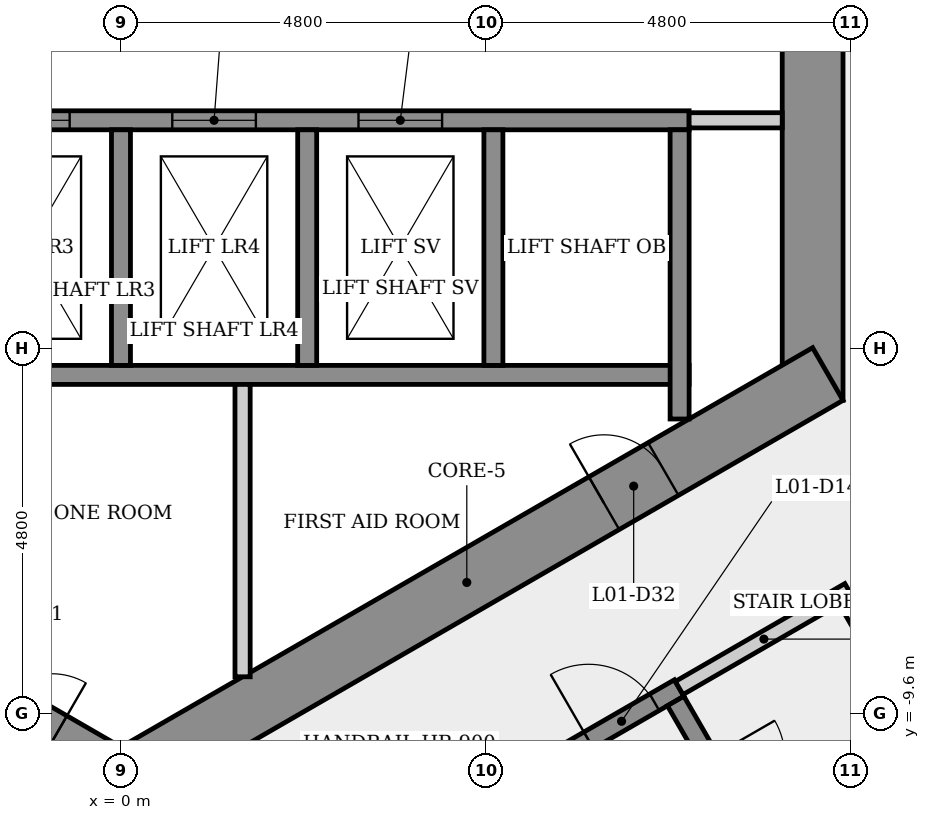
"""IFC4 building model, lengths in metres.
Left out: names, types, materials, properties, quantities, classifications, styles, units other than length and angle.
Written with IfcOpenShell. Run it as: python <this file> out.ifc"""

import sys

from ifc_helpers import new_model, si_unit, direction, frame, frame_2d, origin, place, context, subcontext, project, spatial, rectangle, extrude, element, fill, save


model = new_model("IFC4")
c1 = context("Model", 3, precision=1e-05, world=origin(), true_north=direction((0.0, 1.0)))
c2 = subcontext(c1, "Body", "Model", "MODEL_VIEW")
j1 = project(units=[si_unit("LENGTHUNIT", "METRE"), si_unit("PLANEANGLEUNIT", "RADIAN")], contexts=[c1])
p1 = place(None, origin())
s1 = spatial("IfcSite", under=j1, at=p1, CompositionType="ELEMENT")
p2 = place(p1, origin())
s2 = spatial("IfcBuilding", under=s1, at=p2, CompositionType="ELEMENT")
p3 = place(p2, frame((0.0, 0.0, 7.0)))
s3 = spatial("IfcBuildingStorey", under=s2, at=p3, CompositionType="ELEMENT", Elevation=7.0)
p4 = place(p3, frame((9.1, -5.485, 0.0), z_axis=(0.0, 0.0, 1.0), x_axis=(0.0, 1.0, 0.0)))
e1 = element("IfcWall", 1, at=p4, inside=s3, PredefinedType="SHEAR", context=c2, shape_type="SweptSolid", body=[
    extrude(rectangle(XDim=10.97, YDim=0.8, at=frame_2d((5.485, 0.0))), origin(), (0.0, 0.0, 1.0), 4.5),
])
p5 = place(p4, frame((4.685, 0.0, 0.0)))
e2 = element("IfcOpeningElement", 2, at=p5, cuts=e1, PredefinedType="OPENING", context=c2, shape_type="SweptSolid", body=[
    extrude(rectangle(XDim=1.6, YDim=2.1, at=frame_2d((0.8, 1.05))), frame((0.0, 0.41, 0.0), z_axis=(0.0, -1.0, 0.0), x_axis=(1.0, 0.0, 0.0)), (0.0, 0.0, 1.0), 0.82),
])
p6 = place(p3, frame((-9.3, -5.138, 0.0), z_axis=(0.0, 0.0, 1.0), x_axis=(0.866023993627, -0.500002442456, 0.0)))
e3 = element("IfcWall", 3, at=p6, inside=s3, PredefinedType="SHEAR", context=c2, shape_type="SweptSolid", body=[
    extrude(rectangle(XDim=10.97, YDim=0.8, at=frame_2d((5.485, 0.0))), origin(), (0.0, 0.0, 1.0), 4.5),
])
p7 = place(p6, frame((2.153, 0.0, 0.0)))
e4 = element("IfcOpeningElement", 4, at=p7, cuts=e3, PredefinedType="OPENING", context=c2, shape_type="SweptSolid", body=[
    extrude(rectangle(XDim=0.9, YDim=2.1, at=frame_2d((0.45, 1.05))), frame((0.0, 0.41, 0.0), z_axis=(0.0, -1.0, 0.0), x_axis=(1.0, 0.0, 0.0)), (0.0, 0.0, 1.0), 0.82),
])
p8 = place(p6, frame((8.787, 0.0, 0.0)))
e5 = element("IfcOpeningElement", 5, at=p8, cuts=e3, PredefinedType="OPENING", context=c2, shape_type="SweptSolid", body=[
    extrude(rectangle(XDim=0.9, YDim=2.1, at=frame_2d((0.45, 1.05))), frame((0.0, 0.41, 0.0), z_axis=(0.0, -1.0, 0.0), x_axis=(1.0, 0.0, 0.0)), (0.0, 0.0, 1.0), 0.82),
])
p9 = place(p3, frame((-0.2, -10.623, 0.0), z_axis=(0.0, 0.0, 1.0), x_axis=(0.866023993627, 0.500002442456, 0.0)))
e6 = element("IfcWall", 6, at=p9, inside=s3, PredefinedType="SHEAR", context=c2, shape_type="SweptSolid", body=[
    extrude(rectangle(XDim=10.97, YDim=0.8, at=frame_2d((5.485, 0.0))), origin(), (0.0, 0.0, 1.0), 4.5),
])
p10 = place(p9, frame((7.57, 0.0, 0.0)))
e7 = element("IfcOpeningElement", 7, at=p10, cuts=e6, PredefinedType="OPENING", context=c2, shape_type="SweptSolid", body=[
    extrude(rectangle(XDim=0.9, YDim=2.1, at=frame_2d((0.45, 1.05))), frame((0.0, 0.41, 0.0), z_axis=(0.0, -1.0, 0.0), x_axis=(1.0, 0.0, 0.0)), (0.0, 0.0, 1.0), 0.82),
])
p11 = place(p3, frame((-7.225, -5.15, 0.0), z_axis=(0.0, 0.0, 1.0), x_axis=(1.0, 0.0, 0.0)))
e8 = element("IfcWall", 8, at=p11, inside=s3, PredefinedType="SHEAR", context=c2, shape_type="SweptSolid", body=[
    extrude(rectangle(XDim=14.7, YDim=0.25, at=frame_2d((7.35, 0.0))), origin(), (0.0, 0.0, 1.0), 4.1),
])
p12 = place(p3, frame((-7.225, -1.8, 0.0), z_axis=(0.0, 0.0, 1.0), x_axis=(1.0, 0.0, 0.0)))
e9 = element("IfcWall", 9, at=p12, inside=s3, PredefinedType="SHEAR", context=c2, shape_type="SweptSolid", body=[
    extrude(rectangle(XDim=14.7, YDim=0.25, at=frame_2d((7.35, 0.0))), origin(), (0.0, 0.0, 1.0), 4.1),
])
p13 = place(p12, frame((0.597, 0.0, 0.0)))
e10 = element("IfcOpeningElement", 10, at=p13, cuts=e9, PredefinedType="OPENING", context=c2, shape_type="SweptSolid", body=[
    extrude(rectangle(XDim=1.1, YDim=2.1, at=frame_2d((0.55, 1.05))), frame((0.0, 0.135, 0.0), z_axis=(0.0, -1.0, 0.0), x_axis=(1.0, 0.0, 0.0)), (0.0, 0.0, 1.0), 0.27),
])
p14 = place(p12, frame((3.0, 0.0, 0.0)))
e11 = element("IfcOpeningElement", 11, at=p14, cuts=e9, PredefinedType="OPENING", context=c2, shape_type="SweptSolid", body=[
    extrude(rectangle(XDim=1.1, YDim=2.1, at=frame_2d((0.55, 1.05))), frame((0.0, 0.135, 0.0), z_axis=(0.0, -1.0, 0.0), x_axis=(1.0, 0.0, 0.0)), (0.0, 0.0, 1.0), 0.27),
])
p15 = place(p12, frame((5.45, 0.0, 0.0)))
e12 = element("IfcOpeningElement", 12, at=p15, cuts=e9, PredefinedType="OPENING", context=c2, shape_type="SweptSolid", body=[
    extrude(rectangle(XDim=1.1, YDim=2.1, at=frame_2d((0.55, 1.05))), frame((0.0, 0.135, 0.0), z_axis=(0.0, -1.0, 0.0), x_axis=(1.0, 0.0, 0.0)), (0.0, 0.0, 1.0), 0.27),
])
p16 = place(p12, frame((7.9, 0.0, 0.0)))
e13 = element("IfcOpeningElement", 13, at=p16, cuts=e9, PredefinedType="OPENING", context=c2, shape_type="SweptSolid", body=[
    extrude(rectangle(XDim=1.1, YDim=2.1, at=frame_2d((0.55, 1.05))), frame((0.0, 0.135, 0.0), z_axis=(0.0, -1.0, 0.0), x_axis=(1.0, 0.0, 0.0)), (0.0, 0.0, 1.0), 0.27),
])
p17 = place(p12, frame((10.35, 0.0, 0.0)))
e14 = element("IfcOpeningElement", 14, at=p17, cuts=e9, PredefinedType="OPENING", context=c2, shape_type="SweptSolid", body=[
    extrude(rectangle(XDim=1.1, YDim=2.1, at=frame_2d((0.55, 1.05))), frame((0.0, 0.135, 0.0), z_axis=(0.0, -1.0, 0.0), x_axis=(1.0, 0.0, 0.0)), (0.0, 0.0, 1.0), 0.27),
])
p18 = place(p3, frame((0.0, -1.925, 0.0), z_axis=(0.0, 0.0, 1.0), x_axis=(0.0, -1.0, 0.0)))
e15 = element("IfcWall", 15, at=p18, inside=s3, PredefinedType="SHEAR", context=c2, shape_type="SweptSolid", body=[
    extrude(rectangle(XDim=3.1, YDim=0.25, at=frame_2d((1.55, 0.0))), origin(), (0.0, 0.0, 1.0), 4.5),
])
p19 = place(p3, frame((1.6, -5.275, 0.0), z_axis=(0.0, 0.0, 1.0), x_axis=(0.0, -1.0, 0.0)))
e16 = element("IfcWall", 16, at=p19, inside=s3, PredefinedType="PARTITIONING", context=c2, shape_type="SweptSolid", body=[
    extrude(rectangle(XDim=3.847, YDim=0.2, at=frame_2d((1.924, 0.0))), origin(), (0.0, 0.0, 1.0), 4.1),
])
p20 = place(p3, frame((1.585, -12.595, 0.0), z_axis=(0.0, 0.0, 1.0), x_axis=(0.866036417653, 0.499980922934, 0.0)))
e17 = element("IfcWall", 17, at=p20, inside=s3, PredefinedType="SHEAR", context=c2, shape_type="SweptSolid", body=[
    extrude(rectangle(XDim=6.65, YDim=0.25, at=frame_2d((3.325, 0.0))), origin(), (0.0, 0.0, 1.0), 4.1),
])
p21 = place(p20, frame((5.275, 0.0, 0.0)))
e18 = element("IfcOpeningElement", 18, at=p21, cuts=e17, PredefinedType="OPENING", context=c2, shape_type="SweptSolid", body=[
    extrude(rectangle(XDim=1.0, YDim=2.1, at=frame_2d((0.5, 1.05))), frame((0.0, 0.135, 0.0), z_axis=(0.0, -1.0, 0.0), x_axis=(1.0, 0.0, 0.0)), (0.0, 0.0, 1.0), 0.27),
])
for number, where, z_axis, x_axis in (
    (19, (2.45, -1.925, 0.0), (0.0, 0.0, 1.0), (0.0, -1.0, 0.0)),
    (20, (4.9, -1.925, 0.0), (0.0, 0.0, 1.0), (0.0, -1.0, 0.0)),
):
    element("IfcWall", number, at=place(p3, frame(where, z_axis=z_axis, x_axis=x_axis)), inside=s3, PredefinedType="SHEAR", context=c2, shape_type="SweptSolid", body=[
        extrude(rectangle(XDim=3.1, YDim=0.25, at=frame_2d((1.55, 0.0))), origin(), (0.0, 0.0, 1.0), 4.5),
    ])
p22 = place(p3, frame((7.298, -9.441, 0.0), z_axis=(0.0, 0.0, 1.0), x_axis=(0.500034990121, -0.866005201286, 0.0)))
e21 = element("IfcWall", 21, at=p22, inside=s3, PredefinedType="SHEAR", context=c2, shape_type="SweptSolid", body=[
    extrude(rectangle(XDim=2.75, YDim=0.25, at=frame_2d((1.375, 0.0))), origin(), (0.0, 0.0, 1.0), 4.1),
])
p23 = place(p22, frame((0.875, 0.0, 0.0)))
e22 = element("IfcOpeningElement", 22, at=p23, cuts=e21, PredefinedType="OPENING", context=c2, shape_type="SweptSolid", body=[
    extrude(rectangle(XDim=1.0, YDim=2.1, at=frame_2d((0.5, 1.05))), frame((0.0, 0.135, 0.0), z_axis=(0.0, -1.0, 0.0), x_axis=(1.0, 0.0, 0.0)), (0.0, 0.0, 1.0), 0.27),
])
p24 = place(p3, frame((7.344, -9.27, 0.0), z_axis=(0.0, 0.0, 1.0), x_axis=(0.866005588531, 0.500034319456, 0.0)))
e23 = element("IfcWall", 23, at=p24, inside=s3, PredefinedType="PARTITIONING", context=c2, shape_type="SweptSolid", body=[
    extrude(rectangle(XDim=2.575, YDim=0.2, at=frame_2d((1.288, 0.0))), origin(), (0.0, 0.0, 1.0), 4.1),
])
p25 = place(p3, frame((7.35, -1.925, 0.0), z_axis=(0.0, 0.0, 1.0), x_axis=(0.0, -1.0, 0.0)))
e24 = element("IfcWall", 24, at=p25, inside=s3, PredefinedType="SHEAR", context=c2, shape_type="SweptSolid", body=[
    extrude(rectangle(XDim=3.805, YDim=0.25, at=frame_2d((1.903, 0.0))), origin(), (0.0, 0.0, 1.0), 4.1),
])
p26 = place(p3, frame((8.7, -1.8, 0.0), z_axis=(0.0, 0.0, 1.0), x_axis=(-1.0, 0.0, 0.0)))
e25 = element("IfcWall", 25, at=p26, inside=s3, PredefinedType="PARTITIONING", context=c2, shape_type="SweptSolid", body=[
    extrude(rectangle(XDim=1.225, YDim=0.2, at=frame_2d((0.613, 0.0))), origin(), (0.0, 0.0, 1.0), 4.1),
])
p27 = place(p3, frame((9.537, -8.119, 0.0), z_axis=(0.0, 0.0, 1.0), x_axis=(0.499990139034, -0.866031096941, 0.0)))
e26 = element("IfcWall", 26, at=p27, inside=s3, PredefinedType="PARTITIONING", context=c2, shape_type="SweptSolid", body=[
    extrude(rectangle(XDim=3.0, YDim=0.2, at=frame_2d((1.5, 0.0))), origin(), (0.0, 0.0, 1.0), 4.1),
])
p28 = place(p27, frame((0.935, 0.0, 0.0)))
e27 = element("IfcOpeningElement", 27, at=p28, cuts=e26, PredefinedType="OPENING", context=c2, shape_type="SweptSolid", body=[
    extrude(rectangle(XDim=1.0, YDim=2.1, at=frame_2d((0.5, 1.05))), frame((0.0, 0.11, 0.0), z_axis=(0.0, -1.0, 0.0), x_axis=(1.0, 0.0, 0.0)), (0.0, 0.0, 1.0), 0.22),
])
p29 = place(p15, origin())
e28 = element("IfcDoor", 28, at=p29, inside=s3, OperationType="SLIDING_TO_LEFT", PredefinedType="DOOR", context=c2, shape_type="SweptSolid", body=[
    extrude(rectangle(XDim=1.1, YDim=2.1, at=frame_2d((0.55, 1.05))), frame((0.0, 0.025, 0.0), z_axis=(0.0, -1.0, 0.0), x_axis=(1.0, 0.0, 0.0)), (0.0, 0.0, 1.0), 0.05),
])
fill(e12, e28)
p30 = place(p16, origin())
e29 = element("IfcDoor", 29, at=p30, inside=s3, OperationType="SLIDING_TO_LEFT", PredefinedType="DOOR", context=c2, shape_type="SweptSolid", body=[
    extrude(rectangle(XDim=1.1, YDim=2.1, at=frame_2d((0.55, 1.05))), frame((0.0, 0.025, 0.0), z_axis=(0.0, -1.0, 0.0), x_axis=(1.0, 0.0, 0.0)), (0.0, 0.0, 1.0), 0.05),
])
fill(e13, e29)
p31 = place(p17, origin())
e30 = element("IfcDoor", 30, at=p31, inside=s3, OperationType="SLIDING_TO_LEFT", PredefinedType="DOOR", context=c2, shape_type="SweptSolid", body=[
    extrude(rectangle(XDim=1.1, YDim=2.1, at=frame_2d((0.55, 1.05))), frame((0.0, 0.025, 0.0), z_axis=(0.0, -1.0, 0.0), x_axis=(1.0, 0.0, 0.0)), (0.0, 0.0, 1.0), 0.05),
])
fill(e14, e30)
p32 = place(p21, origin())
e31 = element("IfcDoor", 31, at=p32, inside=s3, OperationType="SINGLE_SWING_LEFT", PredefinedType="DOOR", context=c2, shape_type="SweptSolid", body=[
    extrude(rectangle(XDim=1.0, YDim=2.1, at=frame_2d((0.5, 1.05))), frame((0.0, 0.025, 0.0), z_axis=(0.0, -1.0, 0.0), x_axis=(1.0, 0.0, 0.0)), (0.0, 0.0, 1.0), 0.05),
])
fill(e18, e31)
p33 = place(p8, origin())
e32 = element("IfcDoor", 32, at=p33, inside=s3, OperationType="SINGLE_SWING_RIGHT", PredefinedType="DOOR", context=c2, shape_type="SweptSolid", body=[
    extrude(rectangle(XDim=0.9, YDim=2.1, at=frame_2d((0.45, 1.05))), frame((0.0, 0.025, 0.0), z_axis=(0.0, -1.0, 0.0), x_axis=(1.0, 0.0, 0.0)), (0.0, 0.0, 1.0), 0.05),
])
fill(e5, e32)
p34 = place(p10, origin())
e33 = element("IfcDoor", 33, at=p34, inside=s3, OperationType="SINGLE_SWING_LEFT", PredefinedType="DOOR", context=c2, shape_type="SweptSolid", body=[
    extrude(rectangle(XDim=0.9, YDim=2.1, at=frame_2d((0.45, 1.05))), frame((0.0, 0.025, 0.0), z_axis=(0.0, -1.0, 0.0), x_axis=(1.0, 0.0, 0.0)), (0.0, 0.0, 1.0), 0.05),
])
fill(e7, e33)
save(model, sys.argv[1])
